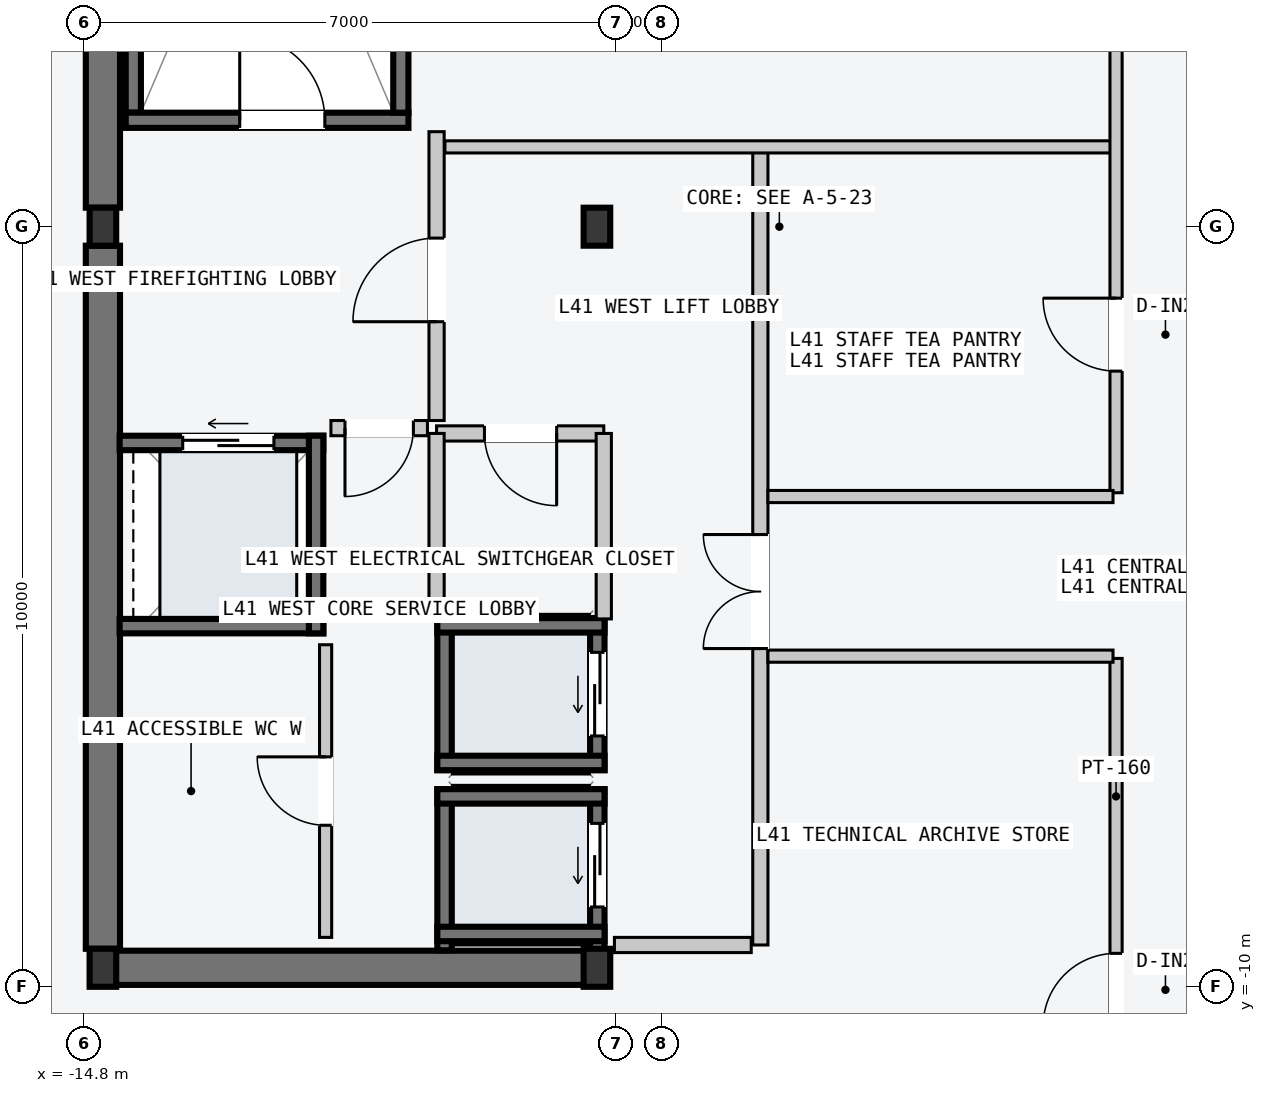
"""IFC4 building model, lengths in metres.
Left out: names, types, materials, properties, quantities, classifications, styles, units other than length and angle.
Written with IfcOpenShell. Run it as: python <this file> out.ifc"""

import sys

from ifc_helpers import new_model, si_unit, direction, frame, frame_2d, origin, origin_2d, place, context, subcontext, project, spatial, rectangle, i_section, extrude, element, fill, save


model = new_model("IFC4")
c1 = context("Model", 3, precision=1e-05, world=origin(), true_north=direction((0.0, 1.0)))
c2 = subcontext(c1, "Body", "Model", "MODEL_VIEW")
j1 = project(units=[si_unit("LENGTHUNIT", "METRE"), si_unit("PLANEANGLEUNIT", "RADIAN")], contexts=[c1])
p1 = place(None, origin())
s1 = spatial("IfcSite", under=j1, at=p1, CompositionType="ELEMENT")
p2 = place(p1, origin())
s2 = spatial("IfcBuilding", under=s1, at=p2, CompositionType="ELEMENT")
p3 = place(p2, frame((0.0, 0.0, 158.7)))
s3 = spatial("IfcBuildingStorey", under=s2, at=p3, CompositionType="ELEMENT", Elevation=158.7)
p4 = place(p3, frame((-14.53, -9.75, -0.2), z_axis=(0.0, 0.0, 1.0), x_axis=(1.0, 0.0, 0.0)))
e1 = element("IfcWall", 1, at=p4, inside=s3, PredefinedType="SHEAR", context=c2, shape_type="SweptSolid", body=[
    extrude(rectangle(XDim=6.46, YDim=0.45, at=frame_2d((3.23, 0.0))), origin(), (0.0, 0.0, 1.0), 3.6),
])
for number, where, z_axis, x_axis in (
    (2, (-14.55, -9.5, -0.2), (0.0, 0.0, 1.0), (0.0, 1.0, 0.0)),
    (3, (-14.55, 0.25, -0.2), (0.0, 0.0, 1.0), (0.0, 1.0, 0.0)),
):
    element("IfcWall", number, at=place(p3, frame(where, z_axis=z_axis, x_axis=x_axis)), inside=s3, PredefinedType="SHEAR", context=c2, shape_type="SweptSolid", body=[
        extrude(rectangle(XDim=9.25, YDim=0.45, at=frame_2d((4.625, 0.0))), origin(), (0.0, 0.0, 1.0), 3.6),
    ])
p5 = place(p3, frame((-14.15, 1.5, -0.2), z_axis=(0.0, 0.0, 1.0), x_axis=(0.0, 1.0, 0.0)))
e4 = element("IfcWall", 4, at=p5, inside=s3, PredefinedType="SOLIDWALL", context=c2, shape_type="SweptSolid", body=[
    extrude(rectangle(XDim=7.8, YDim=0.2, at=frame_2d((3.9, 0.0))), origin(), (0.0, 0.0, 1.0), 3.6),
])
p6 = place(p3, frame((-14.25, 1.4, -0.2), z_axis=(0.0, 0.0, 1.0), x_axis=(1.0, 0.0, 0.0)))
e5 = element("IfcWall", 5, at=p6, inside=s3, PredefinedType="SOLIDWALL", context=c2, shape_type="SweptSolid", body=[
    extrude(rectangle(XDim=3.72, YDim=0.2, at=frame_2d((1.86, 0.0))), origin(), (0.0, 0.0, 1.0), 3.6),
])
p7 = place(p6, frame((1.5, 0.0, 0.2)))
e6 = element("IfcOpeningElement", 6, at=p7, cuts=e5, PredefinedType="OPENING", context=c2, shape_type="SweptSolid", body=[
    extrude(rectangle(XDim=1.12, YDim=2.18, at=frame_2d((0.56, 1.09))), frame((0.0, 0.11, 0.0), z_axis=(0.0, -1.0, 0.0), x_axis=(1.0, 0.0, 0.0)), (0.0, 0.0, 1.0), 0.22),
])
p8 = place(p3, frame((-10.63, 1.5, -0.2), z_axis=(0.0, 0.0, 1.0), x_axis=(0.0, 1.0, 0.0)))
e7 = element("IfcWall", 7, at=p8, inside=s3, PredefinedType="SOLIDWALL", context=c2, shape_type="SweptSolid", body=[
    extrude(rectangle(XDim=7.8, YDim=0.2, at=frame_2d((3.9, 0.0))), origin(), (0.0, 0.0, 1.0), 3.6),
])
for number, where, z_axis, x_axis in (
    (8, (-14.55, -9.75, 0.0), (0.0, 0.0, 1.0), (1.0, 0.0, 0.0)),
    (9, (-14.55, 0.0, 0.0), (0.0, 0.0, 1.0), (1.0, 0.0, 0.0)),
    (10, (-8.05, -9.75, 0.0), (0.0, 0.0, 1.0), (1.0, 0.0, 0.0)),
    (11, (-8.05, 0.0, 0.0), (0.0, 0.0, 1.0), (1.0, 0.0, 0.0)),
):
    element("IfcColumn", number, at=place(p3, frame(where, z_axis=z_axis, x_axis=x_axis)), inside=s3, PredefinedType="COLUMN", context=c2, shape_type="SweptSolid", body=[
        extrude(i_section(OverallWidth=0.35, OverallDepth=0.5, WebThickness=0.02, FlangeThickness=0.032, at=origin_2d()), origin(), (0.0, 0.0, 1.0), 3.6),
    ])
p9 = place(p3, frame((-8.045, -9.52, -0.2), z_axis=(0.0, 0.0, 1.0), x_axis=(0.0, 1.0, 0.0)))
e12 = element("IfcWall", 12, at=p9, inside=s3, PredefinedType="SOLIDWALL", context=c2, shape_type="SweptSolid", body=[
    extrude(rectangle(XDim=2.12, YDim=0.19, at=frame_2d((1.06, 0.0))), origin(), (0.0, 0.0, 1.0), 3.6),
])
p10 = place(p9, frame((0.57, 0.0, 0.2)))
e13 = element("IfcOpeningElement", 13, at=p10, cuts=e12, PredefinedType="OPENING", context=c2, shape_type="SweptSolid", body=[
    extrude(rectangle(XDim=1.1, YDim=2.2, at=frame_2d((0.55, 1.1))), frame((0.0, 0.105, 0.0), z_axis=(0.0, -1.0, 0.0), x_axis=(1.0, 0.0, 0.0)), (0.0, 0.0, 1.0), 0.21),
])
p11 = place(p3, frame((-10.055, -9.52, -0.2), z_axis=(0.0, 0.0, 1.0), x_axis=(0.0, 1.0, 0.0)))
e14 = element("IfcWall", 14, at=p11, inside=s3, PredefinedType="SOLIDWALL", context=c2, shape_type="SweptSolid", body=[
    extrude(rectangle(XDim=2.12, YDim=0.19, at=frame_2d((1.06, 0.0))), origin(), (0.0, 0.0, 1.0), 3.6),
])
for number, where, z_axis, x_axis in (
    (15, (-10.15, -7.495, -0.2), (0.0, 0.0, 1.0), (1.0, 0.0, 0.0)),
    (16, (-10.15, -9.305, -0.2), (0.0, 0.0, 1.0), (1.0, 0.0, 0.0)),
):
    element("IfcWall", number, at=place(p3, frame(where, z_axis=z_axis, x_axis=x_axis)), inside=s3, PredefinedType="SOLIDWALL", context=c2, shape_type="SweptSolid", body=[
        extrude(rectangle(XDim=2.2, YDim=0.19, at=frame_2d((1.1, 0.0))), origin(), (0.0, 0.0, 1.0), 3.6),
    ])
p12 = place(p3, frame((-8.045, -7.15, -0.2), z_axis=(0.0, 0.0, 1.0), x_axis=(0.0, 1.0, 0.0)))
e17 = element("IfcWall", 17, at=p12, inside=s3, PredefinedType="SOLIDWALL", context=c2, shape_type="SweptSolid", body=[
    extrude(rectangle(XDim=2.0, YDim=0.19, at=frame_2d((1.0, 0.0))), origin(), (0.0, 0.0, 1.0), 3.6),
])
p13 = place(p12, frame((0.45, 0.0, 0.2)))
e18 = element("IfcOpeningElement", 18, at=p13, cuts=e17, PredefinedType="OPENING", context=c2, shape_type="SweptSolid", body=[
    extrude(rectangle(XDim=1.1, YDim=2.2, at=frame_2d((0.55, 1.1))), frame((0.0, 0.105, 0.0), z_axis=(0.0, -1.0, 0.0), x_axis=(1.0, 0.0, 0.0)), (0.0, 0.0, 1.0), 0.21),
])
p14 = place(p3, frame((-10.055, -7.15, -0.2), z_axis=(0.0, 0.0, 1.0), x_axis=(0.0, 1.0, 0.0)))
e19 = element("IfcWall", 19, at=p14, inside=s3, PredefinedType="SOLIDWALL", context=c2, shape_type="SweptSolid", body=[
    extrude(rectangle(XDim=2.0, YDim=0.19, at=frame_2d((1.0, 0.0))), origin(), (0.0, 0.0, 1.0), 3.6),
])
for number, where, z_axis, x_axis in (
    (20, (-10.15, -5.245, -0.2), (0.0, 0.0, 1.0), (1.0, 0.0, 0.0)),
    (21, (-10.15, -7.055, -0.2), (0.0, 0.0, 1.0), (1.0, 0.0, 0.0)),
):
    element("IfcWall", number, at=place(p3, frame(where, z_axis=z_axis, x_axis=x_axis)), inside=s3, PredefinedType="SOLIDWALL", context=c2, shape_type="SweptSolid", body=[
        extrude(rectangle(XDim=2.2, YDim=0.19, at=frame_2d((1.1, 0.0))), origin(), (0.0, 0.0, 1.0), 3.6),
    ])
p15 = place(p3, frame((-14.33, -2.845, -0.2), z_axis=(0.0, 0.0, 1.0), x_axis=(1.0, 0.0, 0.0)))
e22 = element("IfcWall", 22, at=p15, inside=s3, PredefinedType="SOLIDWALL", context=c2, shape_type="SweptSolid", body=[
    extrude(rectangle(XDim=2.68, YDim=0.19, at=frame_2d((1.34, 0.0))), origin(), (0.0, 0.0, 1.0), 3.6),
])
p16 = place(p15, frame((0.83, 0.0, 0.2)))
e23 = element("IfcOpeningElement", 23, at=p16, cuts=e22, PredefinedType="OPENING", context=c2, shape_type="SweptSolid", body=[
    extrude(rectangle(XDim=1.2, YDim=2.2, at=frame_2d((0.6, 1.1))), frame((0.0, 0.105, 0.0), z_axis=(0.0, -1.0, 0.0), x_axis=(1.0, 0.0, 0.0)), (0.0, 0.0, 1.0), 0.21),
])
p17 = place(p3, frame((-14.33, -5.255, -0.2), z_axis=(0.0, 0.0, 1.0), x_axis=(1.0, 0.0, 0.0)))
e24 = element("IfcWall", 24, at=p17, inside=s3, PredefinedType="SOLIDWALL", context=c2, shape_type="SweptSolid", body=[
    extrude(rectangle(XDim=2.68, YDim=0.19, at=frame_2d((1.34, 0.0))), origin(), (0.0, 0.0, 1.0), 3.6),
])
p18 = place(p3, frame((-11.745, -5.35, -0.2), z_axis=(0.0, 0.0, 1.0), x_axis=(0.0, 1.0, 0.0)))
e25 = element("IfcWall", 25, at=p18, inside=s3, PredefinedType="SOLIDWALL", context=c2, shape_type="SweptSolid", body=[
    extrude(rectangle(XDim=2.6, YDim=0.19, at=frame_2d((1.3, 0.0))), origin(), (0.0, 0.0, 1.0), 3.6),
])
p19 = place(p3, frame((-5.9, -9.45, 0.0), z_axis=(0.0, 0.0, 1.0), x_axis=(0.0, 1.0, 0.0)))
e26 = element("IfcWall", 26, at=p19, inside=s3, PredefinedType="PARTITIONING", context=c2, shape_type="SweptSolid", body=[
    extrude(rectangle(XDim=10.5, YDim=0.2, at=frame_2d((5.25, 0.0))), origin(), (0.0, 0.0, 1.0), 3.4),
])
p20 = place(p19, frame((3.9, 0.0, 0.0)))
e27 = element("IfcOpeningElement", 27, at=p20, cuts=e26, PredefinedType="OPENING", context=c2, shape_type="SweptSolid", body=[
    extrude(rectangle(XDim=1.5, YDim=2.2, at=frame_2d((0.75, 1.1))), frame((0.0, 0.11, 0.0), z_axis=(0.0, -1.0, 0.0), x_axis=(1.0, 0.0, 0.0)), (0.0, 0.0, 1.0), 0.22),
])
p21 = place(p3, frame((-6.02, -9.45, 0.0), z_axis=(0.0, 0.0, 1.0), x_axis=(-1.0, 0.0, 0.0)))
e28 = element("IfcWall", 28, at=p21, inside=s3, PredefinedType="PARTITIONING", context=c2, shape_type="SweptSolid", body=[
    extrude(rectangle(XDim=1.8, YDim=0.2, at=frame_2d((0.9, 0.0))), origin(), (0.0, 0.0, 1.0), 3.4),
])
p22 = place(p3, frame((-10.16, -2.55, 0.0), z_axis=(0.0, 0.0, 1.0), x_axis=(0.0, 1.0, 0.0)))
e29 = element("IfcWall", 29, at=p22, inside=s3, PredefinedType="PARTITIONING", context=c2, shape_type="SweptSolid", body=[
    extrude(rectangle(XDim=3.8, YDim=0.2, at=frame_2d((1.9, 0.0))), origin(), (0.0, 0.0, 1.0), 3.4),
])
p23 = place(p22, frame((1.3, 0.0, 0.0)))
e30 = element("IfcOpeningElement", 30, at=p23, cuts=e29, PredefinedType="OPENING", context=c2, shape_type="SweptSolid", body=[
    extrude(rectangle(XDim=1.1, YDim=2.15, at=frame_2d((0.55, 1.075))), frame((0.0, 0.11, 0.0), z_axis=(0.0, -1.0, 0.0), x_axis=(1.0, 0.0, 0.0)), (0.0, 0.0, 1.0), 0.22),
])
p24 = place(p3, frame((-10.28, -2.65, 0.0), z_axis=(0.0, 0.0, 1.0), x_axis=(-1.0, 0.0, 0.0)))
e31 = element("IfcWall", 31, at=p24, inside=s3, PredefinedType="PARTITIONING", context=c2, shape_type="SweptSolid", body=[
    extrude(rectangle(XDim=1.27, YDim=0.2, at=frame_2d((0.635, 0.0))), origin(), (0.0, 0.0, 1.0), 3.4),
])
p25 = place(p24, frame((0.185, 0.0, 0.0)))
e32 = element("IfcOpeningElement", 32, at=p25, cuts=e31, PredefinedType="OPENING", context=c2, shape_type="SweptSolid", body=[
    extrude(rectangle(XDim=0.9, YDim=2.15, at=frame_2d((0.45, 1.075))), frame((0.0, 0.11, 0.0), z_axis=(0.0, -1.0, 0.0), x_axis=(1.0, 0.0, 0.0)), (0.0, 0.0, 1.0), 0.22),
])
p26 = place(p3, frame((-7.96, -2.72, 0.0), z_axis=(0.0, 0.0, 1.0), x_axis=(-1.0, 0.0, 0.0)))
e33 = element("IfcWall", 33, at=p26, inside=s3, PredefinedType="PARTITIONING", context=c2, shape_type="SweptSolid", body=[
    extrude(rectangle(XDim=2.2, YDim=0.2, at=frame_2d((1.1, 0.0))), origin(), (0.0, 0.0, 1.0), 3.4),
])
p27 = place(p26, frame((0.62, 0.0, 0.0)))
e34 = element("IfcOpeningElement", 34, at=p27, cuts=e33, PredefinedType="OPENING", context=c2, shape_type="SweptSolid", body=[
    extrude(rectangle(XDim=0.95, YDim=2.1, at=frame_2d((0.475, 1.05))), frame((0.0, 0.11, 0.0), z_axis=(0.0, -1.0, 0.0), x_axis=(1.0, 0.0, 0.0)), (0.0, 0.0, 1.0), 0.22),
])
for number, where, z_axis, x_axis in (
    (35, (-7.96, -5.16, 0.0), (0.0, 0.0, 1.0), (0.0, 1.0, 0.0)),
    (36, (-10.16, -5.16, 0.0), (0.0, 0.0, 1.0), (0.0, 1.0, 0.0)),
):
    element("IfcWall", number, at=place(p3, frame(where, z_axis=z_axis, x_axis=x_axis)), inside=s3, PredefinedType="PARTITIONING", context=c2, shape_type="SweptSolid", body=[
        extrude(rectangle(XDim=2.44, YDim=0.2, at=frame_2d((1.22, 0.0))), origin(), (0.0, 0.0, 1.0), 3.4),
    ])
p28 = place(p3, frame((-11.62, -9.35, 0.0), z_axis=(0.0, 0.0, 1.0), x_axis=(0.0, 1.0, 0.0)))
e37 = element("IfcWall", 37, at=p28, inside=s3, PredefinedType="PARTITIONING", context=c2, shape_type="SweptSolid", body=[
    extrude(rectangle(XDim=3.85, YDim=0.16, at=frame_2d((1.925, 0.0))), origin(), (0.0, 0.0, 1.0), 3.4),
])
p29 = place(p28, frame((1.475, 0.0, 0.0)))
e38 = element("IfcOpeningElement", 38, at=p29, cuts=e37, PredefinedType="OPENING", context=c2, shape_type="SweptSolid", body=[
    extrude(rectangle(XDim=0.9, YDim=2.15, at=frame_2d((0.45, 1.075))), frame((0.0, 0.09, 0.0), z_axis=(0.0, -1.0, 0.0), x_axis=(1.0, 0.0, 0.0)), (0.0, 0.0, 1.0), 0.18),
])
p30 = place(p3, frame((-10.05, 1.05, 0.0), z_axis=(0.0, 0.0, 1.0), x_axis=(1.0, 0.0, 0.0)))
e39 = element("IfcWall", 39, at=p30, inside=s3, PredefinedType="PARTITIONING", context=c2, shape_type="SweptSolid", body=[
    extrude(rectangle(XDim=8.79, YDim=0.16, at=frame_2d((4.395, 0.0))), origin(), (0.0, 0.0, 1.0), 3.4),
])
p31 = place(p3, frame((-1.22, -3.5, 0.0), z_axis=(0.0, 0.0, 1.0), x_axis=(0.0, 1.0, 0.0)))
e40 = element("IfcWall", 40, at=p31, inside=s3, PredefinedType="PARTITIONING", context=c2, shape_type="SweptSolid", body=[
    extrude(rectangle(XDim=13.51, YDim=0.16, at=frame_2d((6.755, 0.0))), origin(), (0.0, 0.0, 1.0), 3.4),
])
p32 = place(p31, frame((6.1, 0.0, 0.0)))
e41 = element("IfcOpeningElement", 41, at=p32, cuts=e40, PredefinedType="OPENING", context=c2, shape_type="SweptSolid", body=[
    extrude(rectangle(XDim=1.24, YDim=2.24, at=frame_2d((0.62, 1.12))), frame((0.0, 0.09, 0.0), z_axis=(0.0, -1.0, 0.0), x_axis=(1.0, 0.0, 0.0)), (0.0, 0.0, 1.0), 0.18),
])
p33 = place(p31, frame((1.6, 0.0, 0.0)))
e42 = element("IfcOpeningElement", 42, at=p33, cuts=e40, PredefinedType="OPENING", context=c2, shape_type="SweptSolid", body=[
    extrude(rectangle(XDim=0.96, YDim=2.18, at=frame_2d((0.48, 1.09))), frame((0.0, 0.09, 0.0), z_axis=(0.0, -1.0, 0.0), x_axis=(1.0, 0.0, 0.0)), (0.0, 0.0, 1.0), 0.18),
])
p34 = place(p3, frame((-5.8, -3.55, 0.0), z_axis=(0.0, 0.0, 1.0), x_axis=(1.0, 0.0, 0.0)))
e43 = element("IfcWall", 43, at=p34, inside=s3, PredefinedType="PARTITIONING", context=c2, shape_type="SweptSolid", body=[
    extrude(rectangle(XDim=4.54, YDim=0.16, at=frame_2d((2.27, 0.0))), origin(), (0.0, 0.0, 1.0), 3.4),
])
p35 = place(p3, frame((-1.22, -11.67, 0.0), z_axis=(0.0, 0.0, 1.0), x_axis=(0.0, 1.0, 0.0)))
e44 = element("IfcWall", 44, at=p35, inside=s3, PredefinedType="PARTITIONING", context=c2, shape_type="SweptSolid", body=[
    extrude(rectangle(XDim=5.99, YDim=0.16, at=frame_2d((2.995, 0.0))), origin(), (0.0, 0.0, 1.0), 3.4),
])
p36 = place(p35, frame((1.15, 0.0, 0.0)))
e45 = element("IfcOpeningElement", 45, at=p36, cuts=e44, PredefinedType="OPENING", context=c2, shape_type="SweptSolid", body=[
    extrude(rectangle(XDim=0.96, YDim=2.18, at=frame_2d((0.48, 1.09))), frame((0.0, 0.09, 0.0), z_axis=(0.0, -1.0, 0.0), x_axis=(1.0, 0.0, 0.0)), (0.0, 0.0, 1.0), 0.18),
])
p37 = place(p3, frame((-5.8, -5.65, 0.0), z_axis=(0.0, 0.0, 1.0), x_axis=(1.0, 0.0, 0.0)))
e46 = element("IfcWall", 46, at=p37, inside=s3, PredefinedType="PARTITIONING", context=c2, shape_type="SweptSolid", body=[
    extrude(rectangle(XDim=4.54, YDim=0.16, at=frame_2d((2.27, 0.0))), origin(), (0.0, 0.0, 1.0), 3.4),
])
p38 = place(p7, origin())
e47 = element("IfcDoor", 47, at=p38, inside=s3, OperationType="SINGLE_SWING_LEFT", PredefinedType="DOOR", context=c2, shape_type="SweptSolid", body=[
    extrude(rectangle(XDim=1.12, YDim=2.18, at=frame_2d((0.56, 1.09))), frame((0.0, 0.025, 0.0), z_axis=(0.0, -1.0, 0.0), x_axis=(1.0, 0.0, 0.0)), (0.0, 0.0, 1.0), 0.05),
])
fill(e6, e47)
p39 = place(p10, origin())
e48 = element("IfcDoor", 48, at=p39, inside=s3, OperationType="SLIDING_TO_LEFT", PredefinedType="DOOR", context=c2, shape_type="SweptSolid", body=[
    extrude(rectangle(XDim=1.1, YDim=2.2, at=frame_2d((0.55, 1.1))), frame((0.0, 0.025, 0.0), z_axis=(0.0, -1.0, 0.0), x_axis=(1.0, 0.0, 0.0)), (0.0, 0.0, 1.0), 0.05),
])
fill(e13, e48)
p40 = place(p13, origin())
e49 = element("IfcDoor", 49, at=p40, inside=s3, OperationType="SLIDING_TO_LEFT", PredefinedType="DOOR", context=c2, shape_type="SweptSolid", body=[
    extrude(rectangle(XDim=1.1, YDim=2.2, at=frame_2d((0.55, 1.1))), frame((0.0, 0.025, 0.0), z_axis=(0.0, -1.0, 0.0), x_axis=(1.0, 0.0, 0.0)), (0.0, 0.0, 1.0), 0.05),
])
fill(e18, e49)
p41 = place(p16, origin())
e50 = element("IfcDoor", 50, at=p41, inside=s3, OperationType="SLIDING_TO_LEFT", PredefinedType="DOOR", context=c2, shape_type="SweptSolid", body=[
    extrude(rectangle(XDim=1.2, YDim=2.2, at=frame_2d((0.6, 1.1))), frame((0.0, 0.025, 0.0), z_axis=(0.0, -1.0, 0.0), x_axis=(1.0, 0.0, 0.0)), (0.0, 0.0, 1.0), 0.05),
])
fill(e23, e50)
p42 = place(p20, origin())
e51 = element("IfcDoor", 51, at=p42, inside=s3, OperationType="DOUBLE_DOOR_SINGLE_SWING", PredefinedType="DOOR", context=c2, shape_type="SweptSolid", body=[
    extrude(rectangle(XDim=1.5, YDim=2.2, at=frame_2d((0.75, 1.1))), frame((0.0, 0.025, 0.0), z_axis=(0.0, -1.0, 0.0), x_axis=(1.0, 0.0, 0.0)), (0.0, 0.0, 1.0), 0.05),
])
fill(e27, e51)
p43 = place(p23, origin())
e52 = element("IfcDoor", 52, at=p43, inside=s3, OperationType="SINGLE_SWING_LEFT", PredefinedType="DOOR", context=c2, shape_type="SweptSolid", body=[
    extrude(rectangle(XDim=1.1, YDim=2.15, at=frame_2d((0.55, 1.075))), frame((0.0, 0.025, 0.0), z_axis=(0.0, -1.0, 0.0), x_axis=(1.0, 0.0, 0.0)), (0.0, 0.0, 1.0), 0.05),
])
fill(e30, e52)
p44 = place(p25, origin())
e53 = element("IfcDoor", 53, at=p44, inside=s3, OperationType="SINGLE_SWING_RIGHT", PredefinedType="DOOR", context=c2, shape_type="SweptSolid", body=[
    extrude(rectangle(XDim=0.9, YDim=2.15, at=frame_2d((0.45, 1.075))), frame((0.0, 0.025, 0.0), z_axis=(0.0, -1.0, 0.0), x_axis=(1.0, 0.0, 0.0)), (0.0, 0.0, 1.0), 0.05),
])
fill(e32, e53)
p45 = place(p27, origin())
e54 = element("IfcDoor", 54, at=p45, inside=s3, OperationType="SINGLE_SWING_LEFT", PredefinedType="DOOR", context=c2, shape_type="SweptSolid", body=[
    extrude(rectangle(XDim=0.95, YDim=2.1, at=frame_2d((0.475, 1.05))), frame((0.0, 0.025, 0.0), z_axis=(0.0, -1.0, 0.0), x_axis=(1.0, 0.0, 0.0)), (0.0, 0.0, 1.0), 0.05),
])
fill(e34, e54)
p46 = place(p29, origin())
e55 = element("IfcDoor", 55, at=p46, inside=s3, OperationType="SINGLE_SWING_RIGHT", PredefinedType="DOOR", context=c2, shape_type="SweptSolid", body=[
    extrude(rectangle(XDim=0.9, YDim=2.15, at=frame_2d((0.45, 1.075))), frame((0.0, 0.025, 0.0), z_axis=(0.0, -1.0, 0.0), x_axis=(1.0, 0.0, 0.0)), (0.0, 0.0, 1.0), 0.05),
])
fill(e38, e55)
p47 = place(p33, origin())
e56 = element("IfcDoor", 56, at=p47, inside=s3, OperationType="SINGLE_SWING_RIGHT", PredefinedType="DOOR", context=c2, shape_type="SweptSolid", body=[
    extrude(rectangle(XDim=0.96, YDim=2.18, at=frame_2d((0.48, 1.09))), frame((0.0, 0.025, 0.0), z_axis=(0.0, -1.0, 0.0), x_axis=(1.0, 0.0, 0.0)), (0.0, 0.0, 1.0), 0.05),
])
fill(e42, e56)
p48 = place(p36, origin())
e57 = element("IfcDoor", 57, at=p48, inside=s3, OperationType="SINGLE_SWING_LEFT", PredefinedType="DOOR", context=c2, shape_type="SweptSolid", body=[
    extrude(rectangle(XDim=0.96, YDim=2.18, at=frame_2d((0.48, 1.09))), frame((0.0, 0.025, 0.0), z_axis=(0.0, -1.0, 0.0), x_axis=(1.0, 0.0, 0.0)), (0.0, 0.0, 1.0), 0.05),
])
fill(e45, e57)
save(model, sys.argv[1])
